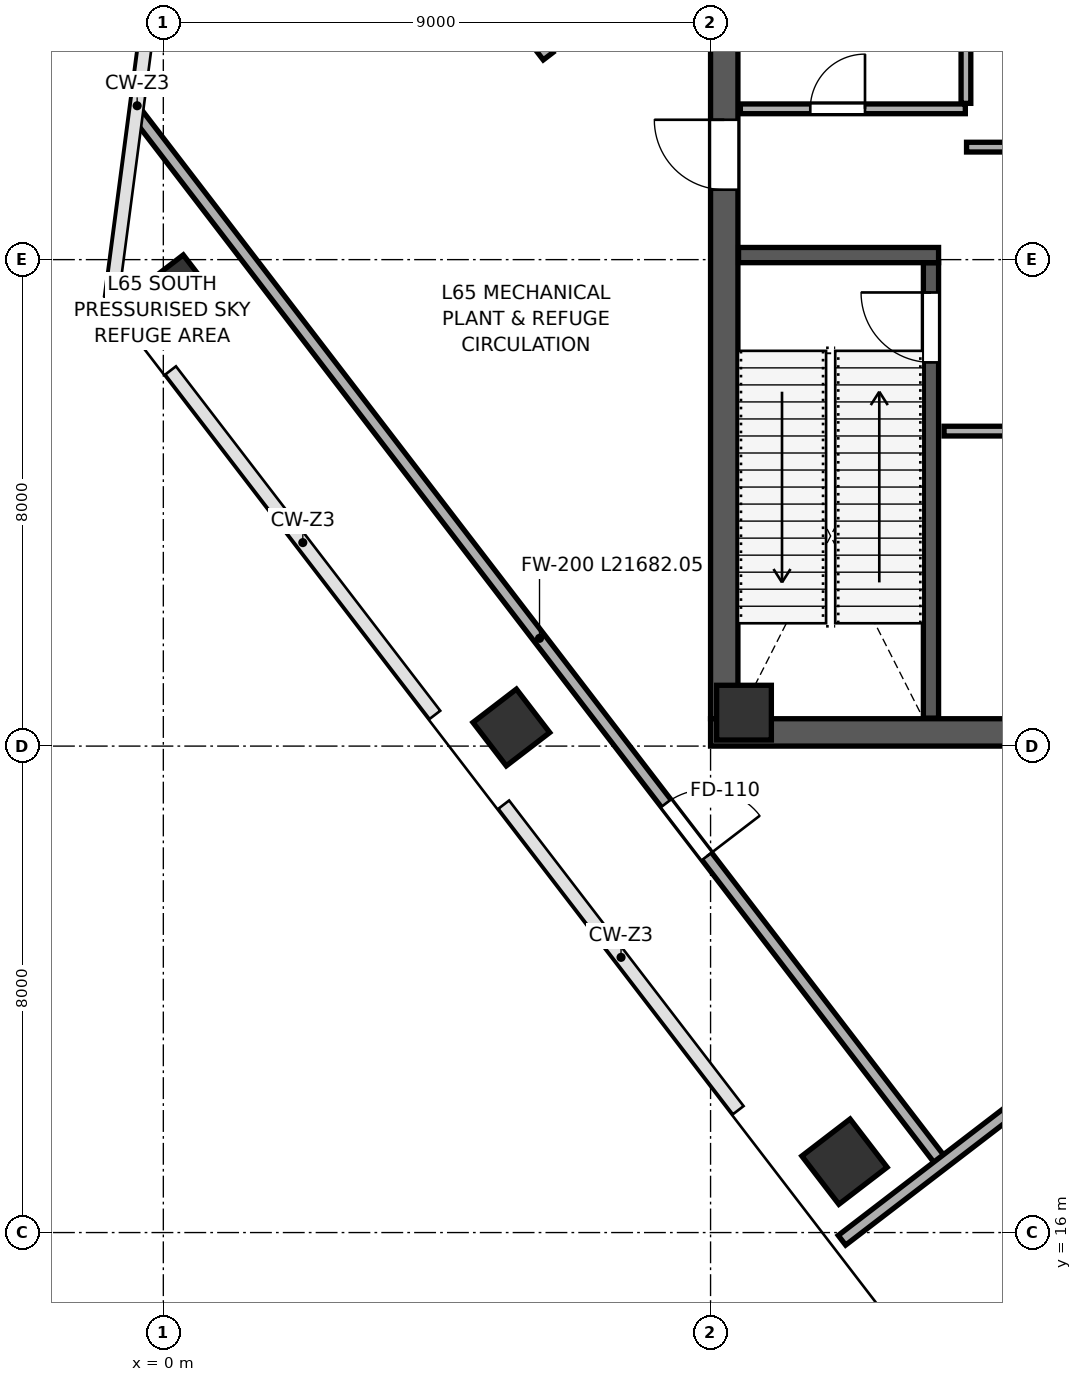
"""IFC4 building model, lengths in metres.
Left out: names, types, materials, properties, quantities, classifications, styles, units other than length and angle.
Written with IfcOpenShell. Run it as: python <this file> out.ifc"""

import sys

from ifc_helpers import new_model, si_unit, direction, frame, frame_2d, origin, origin_2d, place, context, subcontext, project, spatial, rectangle, extrude, clip, halfspace, source, transform, mapped, element, fill, save


model = new_model("IFC4")
c1 = context("Model", 3, precision=1e-05, world=origin(), true_north=direction((0.0, 1.0)))
c2 = subcontext(c1, "Body", "Model", "MODEL_VIEW")
j1 = project(units=[si_unit("LENGTHUNIT", "METRE"), si_unit("PLANEANGLEUNIT", "RADIAN")], contexts=[c1])
p1 = place(None, origin())
s1 = spatial("IfcSite", under=j1, at=p1, CompositionType="ELEMENT")
p2 = place(p1, origin())
s2 = spatial("IfcBuilding", under=s1, at=p2, CompositionType="ELEMENT")
p3 = place(p2, frame((0.0, 0.0, 287.8)))
s3 = spatial("IfcBuildingStorey", under=s2, at=p3, CompositionType="ELEMENT", Elevation=287.8)
m1 = source(origin(), c2, "Body", "SweptSolid", [
    extrude(rectangle(XDim=0.9, YDim=0.9, at=origin_2d()), origin(), (0.0, 0.0, 1.0), 5.999),
])
p4 = place(p3, frame((9.55, 24.55, 0.001), z_axis=(0.0, 0.0, 1.0), x_axis=(1.0, 0.0, 0.0)))
e1 = element("IfcColumn", 1, at=p4, inside=s3, PredefinedType="COLUMN", context=c2, shape_type="MappedRepresentation", body=[
    mapped(m1, transform((0.0, 0.0, 0.0), scale=1.0)),
])
p5 = place(p3, frame((0.245, 31.446, 0.0), z_axis=(-0.000643399733, 0.152767224151, 0.988261990194), x_axis=(0.612058094759, -0.781470139505, 0.121199462463)))
e2 = element("IfcColumn", 2, at=p5, inside=s3, PredefinedType="COLUMN", context=c2, shape_type="Clipping", body=[
    clip(clip(extrude(rectangle(XDim=0.9, YDim=0.9, at=origin_2d()), origin(), (0.0, 0.0, 1.0), 6.071), halfspace(frame((0.0, 0.0, 0.098), z_axis=(0.0, 0.0, -1.0), x_axis=(1.0, 0.0, 0.0)), False)), halfspace(frame((0.0, 0.0, 5.973), z_axis=(0.0, 0.0, 1.0), x_axis=(1.0, 0.0, 0.0)), False)),
])
p6 = place(p3, frame((5.724, 24.306, 0.0), z_axis=(-0.052996112763, 0.114993088547, 0.991951612539), x_axis=(0.882260222834, -0.459919782959, 0.10045243873)))
e3 = element("IfcColumn", 3, at=p6, inside=s3, PredefinedType="COLUMN", context=c2, shape_type="Clipping", body=[
    clip(clip(extrude(rectangle(XDim=0.9, YDim=0.9, at=origin_2d()), origin(), (0.0, 0.0, 1.0), 6.049), halfspace(frame((0.0, 0.0, 0.081), z_axis=(0.0, 0.0, -1.0), x_axis=(1.0, 0.0, 0.0)), False)), halfspace(frame((0.0, 0.0, 5.967), z_axis=(0.0, 0.0, 1.0), x_axis=(1.0, 0.0, 0.0)), False)),
])
p7 = place(p3, frame((11.202, 17.166, 0.0), z_axis=(-0.105297550082, 0.076532357281, 0.991491414101), x_axis=(0.994201661281, 0.029964203351, 0.103272470792)))
e4 = element("IfcColumn", 4, at=p7, inside=s3, PredefinedType="COLUMN", context=c2, shape_type="Clipping", body=[
    clip(clip(extrude(rectangle(XDim=1.0, YDim=1.0, at=origin_2d()), origin(), (0.0, 0.0, 1.0), 6.052), halfspace(frame((0.0, 0.0, 0.093), z_axis=(0.0, 0.0, -1.0), x_axis=(1.0, 0.0, 0.0)), False)), halfspace(frame((0.0, 0.0, 5.959), z_axis=(0.0, 0.0, 1.0), x_axis=(1.0, 0.0, 0.0)), False)),
])
p8 = place(p3, frame((9.225, 24.45, 0.0), z_axis=(0.0, 0.0, 1.0), x_axis=(0.0, 1.0, 0.0)))
e5 = element("IfcWall", 5, at=p8, inside=s3, PredefinedType="SHEAR", context=c2, shape_type="SweptSolid", body=[
    extrude(rectangle(XDim=15.1, YDim=0.45, at=frame_2d((7.55, 0.0))), origin(), (0.0, 0.0, 1.0), 5.72),
])
p9 = place(p8, frame((8.7, 0.0, 0.0)))
e6 = element("IfcOpeningElement", 6, at=p9, cuts=e5, PredefinedType="OPENING", context=c2, shape_type="SweptSolid", body=[
    extrude(rectangle(XDim=1.15, YDim=2.2, at=frame_2d((0.575, 1.1))), frame((0.0, 0.235, 0.0), z_axis=(0.0, -1.0, 0.0), x_axis=(1.0, 0.0, 0.0)), (0.0, 0.0, 1.0), 0.47),
])
p10 = place(p3, frame((9.0, 24.225, 0.0), z_axis=(0.0, 0.0, 1.0), x_axis=(1.0, 0.0, 0.0)))
e7 = element("IfcWall", 7, at=p10, inside=s3, PredefinedType="SHEAR", context=c2, shape_type="SweptSolid", body=[
    extrude(rectangle(XDim=18.0, YDim=0.45, at=frame_2d((9.0, 0.0))), origin(), (0.0, 0.0, 1.0), 5.72),
])
p11 = place(p3, frame((12.625, 24.46, 0.0), z_axis=(0.0, 0.0, 1.0), x_axis=(0.0, 1.0, 0.0)))
e8 = element("IfcWall", 8, at=p11, inside=s3, PredefinedType="SHEAR", context=c2, shape_type="SweptSolid", body=[
    extrude(rectangle(XDim=7.49, YDim=0.25, at=frame_2d((3.745, 0.0))), origin(), (0.0, 0.0, 1.0), 5.72),
])
p12 = place(p11, frame((5.85, 0.0, 0.0)))
e9 = element("IfcOpeningElement", 9, at=p12, cuts=e8, PredefinedType="OPENING", context=c2, shape_type="SweptSolid", body=[
    extrude(rectangle(XDim=1.15, YDim=2.2, at=frame_2d((0.575, 1.1))), frame((0.0, 0.135, 0.0), z_axis=(0.0, -1.0, 0.0), x_axis=(1.0, 0.0, 0.0)), (0.0, 0.0, 1.0), 0.27),
])
p13 = place(p3, frame((9.46, 32.075, 0.0), z_axis=(0.0, 0.0, 1.0), x_axis=(1.0, 0.0, 0.0)))
e10 = element("IfcWall", 10, at=p13, inside=s3, PredefinedType="SHEAR", context=c2, shape_type="SweptSolid", body=[
    extrude(rectangle(XDim=3.29, YDim=0.25, at=frame_2d((1.645, 0.0))), origin(), (0.0, 0.0, 1.0), 5.72),
])
p14 = place(p3, frame((9.49, 34.48, 0.0), z_axis=(0.0, 0.0, 1.0), x_axis=(1.0, 0.0, 0.0)))
e11 = element("IfcWall", 11, at=p14, inside=s3, PredefinedType="PARTITIONING", context=c2, shape_type="SweptSolid", body=[
    extrude(rectangle(XDim=3.7, YDim=0.16, at=frame_2d((1.85, 0.0))), origin(), (0.0, 0.0, 1.0), 5.72),
])
p15 = place(p14, frame((1.15, 0.0, 0.0)))
e12 = element("IfcOpeningElement", 12, at=p15, cuts=e11, PredefinedType="OPENING", context=c2, shape_type="SweptSolid", body=[
    extrude(rectangle(XDim=0.9, YDim=2.15, at=frame_2d((0.45, 1.075))), frame((0.0, 0.09, 0.0), z_axis=(0.0, -1.0, 0.0), x_axis=(1.0, 0.0, 0.0)), (0.0, 0.0, 1.0), 0.18),
])
p16 = place(p3, frame((13.2, 34.57, 0.0), z_axis=(0.0, 0.0, 1.0), x_axis=(0.0, 1.0, 0.0)))
e13 = element("IfcWall", 13, at=p16, inside=s3, PredefinedType="PARTITIONING", context=c2, shape_type="SweptSolid", body=[
    extrude(rectangle(XDim=1.57, YDim=0.16, at=frame_2d((0.785, 0.0))), origin(), (0.0, 0.0, 1.0), 5.72),
])
p17 = place(p3, frame((13.21, 33.85, 0.0), z_axis=(0.0, 0.0, 1.0), x_axis=(1.0, 0.0, 0.0)))
e14 = element("IfcWall", 14, at=p17, inside=s3, PredefinedType="PARTITIONING", context=c2, shape_type="SweptSolid", body=[
    extrude(rectangle(XDim=4.1, YDim=0.16, at=frame_2d((2.05, 0.0))), origin(), (0.0, 0.0, 1.0), 5.72),
])
p18 = place(p17, frame((1.35, 0.0, 0.0)))
e15 = element("IfcOpeningElement", 15, at=p18, cuts=e14, PredefinedType="OPENING", context=c2, shape_type="SweptSolid", body=[
    extrude(rectangle(XDim=0.9, YDim=2.15, at=frame_2d((0.45, 1.075))), frame((0.0, 0.09, 0.0), z_axis=(0.0, -1.0, 0.0), x_axis=(1.0, 0.0, 0.0)), (0.0, 0.0, 1.0), 0.18),
])
p19 = place(p3, frame((12.84, 29.18, 0.0), z_axis=(0.0, 0.0, 1.0), x_axis=(1.0, 0.0, 0.0)))
e16 = element("IfcWall", 16, at=p19, inside=s3, PredefinedType="PARTITIONING", context=c2, shape_type="SweptSolid", body=[
    extrude(rectangle(XDim=8.37, YDim=0.16, at=frame_2d((4.185, 0.0))), origin(), (0.0, 0.0, 1.0), 5.72),
])
p20 = place(p19, frame((2.6, 0.0, 0.0)))
e17 = element("IfcOpeningElement", 17, at=p20, cuts=e16, PredefinedType="OPENING", context=c2, shape_type="SweptSolid", body=[
    extrude(rectangle(XDim=0.9, YDim=2.15, at=frame_2d((0.45, 1.075))), frame((0.0, 0.09, 0.0), z_axis=(0.0, -1.0, 0.0), x_axis=(1.0, 0.0, 0.0)), (0.0, 0.0, 1.0), 0.18),
])
p21 = place(p3, frame((-0.413, 34.373, 0.0), z_axis=(0.0, 0.0, 1.0), x_axis=(0.608759126262, -0.793355107246, 0.0)))
e18 = element("IfcWall", 18, at=p21, inside=s3, PredefinedType="SOLIDWALL", context=c2, shape_type="SweptSolid", body=[
    extrude(rectangle(XDim=21.682, YDim=0.2, at=frame_2d((10.841, 0.0))), origin(), (0.0, 0.0, 1.0), 5.72),
])
p22 = place(p21, frame((14.26, 0.0, 0.0)))
e19 = element("IfcOpeningElement", 19, at=p22, cuts=e18, PredefinedType="OPENING", context=c2, shape_type="SweptSolid", body=[
    extrude(rectangle(XDim=1.1, YDim=2.2, at=frame_2d((0.55, 1.1))), frame((0.0, 0.11, 0.0), z_axis=(0.0, -1.0, 0.0), x_axis=(1.0, 0.0, 0.0)), (0.0, 0.0, 1.0), 0.22),
])
p23 = place(p3, frame((11.161, 15.873, 0.0), z_axis=(0.0, 0.0, 1.0), x_axis=(0.793361083019, 0.608751338357, 0.0)))
e20 = element("IfcWall", 20, at=p23, inside=s3, PredefinedType="SOLIDWALL", context=c2, shape_type="SweptSolid", body=[
    extrude(rectangle(XDim=12.98, YDim=0.2, at=frame_2d((6.49, 0.0))), origin(), (0.0, 0.0, 1.0), 5.72),
])
p24 = place(p3, frame((2.901, 39.812, 0.0), z_axis=(0.0, 0.0, 1.0), x_axis=(0.608733737657, -0.793374587845, 0.0)))
e21 = element("IfcWall", 21, at=p24, inside=s3, PredefinedType="SOLIDWALL", context=c2, shape_type="SweptSolid", body=[
    extrude(rectangle(XDim=5.63, YDim=0.2, at=frame_2d((2.815, 0.0))), origin(), (0.0, 0.0, 1.0), 5.72),
])
m2 = source(origin(), c2, "Body", "SweptSolid", [
    extrude(rectangle(XDim=1.15, YDim=2.2, at=frame_2d((0.575, 1.1))), frame((0.0, 0.025, 0.0), z_axis=(0.0, -1.0, 0.0), x_axis=(1.0, 0.0, 0.0)), (0.0, 0.0, 1.0), 0.05),
])
p25 = place(p12, origin())
e22 = element("IfcDoor", 22, at=p25, inside=s3, OperationType="SINGLE_SWING_RIGHT", PredefinedType="DOOR", context=c2, shape_type="MappedRepresentation", body=[
    mapped(m2, transform((0.0, 0.0, 0.0), scale=1.0)),
])
fill(e9, e22)
m3 = source(origin(), c2, "Body", "SweptSolid", [
    extrude(rectangle(XDim=1.15, YDim=2.2, at=frame_2d((0.575, 1.1))), frame((0.0, 0.025, 0.0), z_axis=(0.0, -1.0, 0.0), x_axis=(1.0, 0.0, 0.0)), (0.0, 0.0, 1.0), 0.05),
])
p26 = place(p9, origin())
e23 = element("IfcDoor", 23, at=p26, inside=s3, OperationType="SINGLE_SWING_RIGHT", PredefinedType="DOOR", context=c2, shape_type="MappedRepresentation", body=[
    mapped(m3, transform((0.0, 0.0, 0.0), scale=1.0)),
])
fill(e6, e23)
m4 = source(origin(), c2, "Body", "SweptSolid", [
    extrude(rectangle(XDim=0.9, YDim=2.15, at=frame_2d((0.45, 1.075))), frame((0.0, 0.025, 0.0), z_axis=(0.0, -1.0, 0.0), x_axis=(1.0, 0.0, 0.0)), (0.0, 0.0, 1.0), 0.05),
])
p27 = place(p15, origin())
e24 = element("IfcDoor", 24, at=p27, inside=s3, OperationType="SINGLE_SWING_RIGHT", PredefinedType="DOOR", context=c2, shape_type="MappedRepresentation", body=[
    mapped(m4, transform((0.0, 0.0, 0.0), scale=1.0)),
])
fill(e12, e24)
m5 = source(origin(), c2, "Body", "SweptSolid", [
    extrude(rectangle(XDim=1.1, YDim=2.2, at=frame_2d((0.55, 1.1))), frame((0.0, 0.025, 0.0), z_axis=(0.0, -1.0, 0.0), x_axis=(1.0, 0.0, 0.0)), (0.0, 0.0, 1.0), 0.05),
])
p28 = place(p22, origin())
e25 = element("IfcDoor", 25, at=p28, inside=s3, OperationType="SINGLE_SWING_RIGHT", PredefinedType="DOOR", context=c2, shape_type="MappedRepresentation", body=[
    mapped(m5, transform((0.0, 0.0, 0.0), scale=1.0)),
])
fill(e19, e25)
save(model, sys.argv[1])
